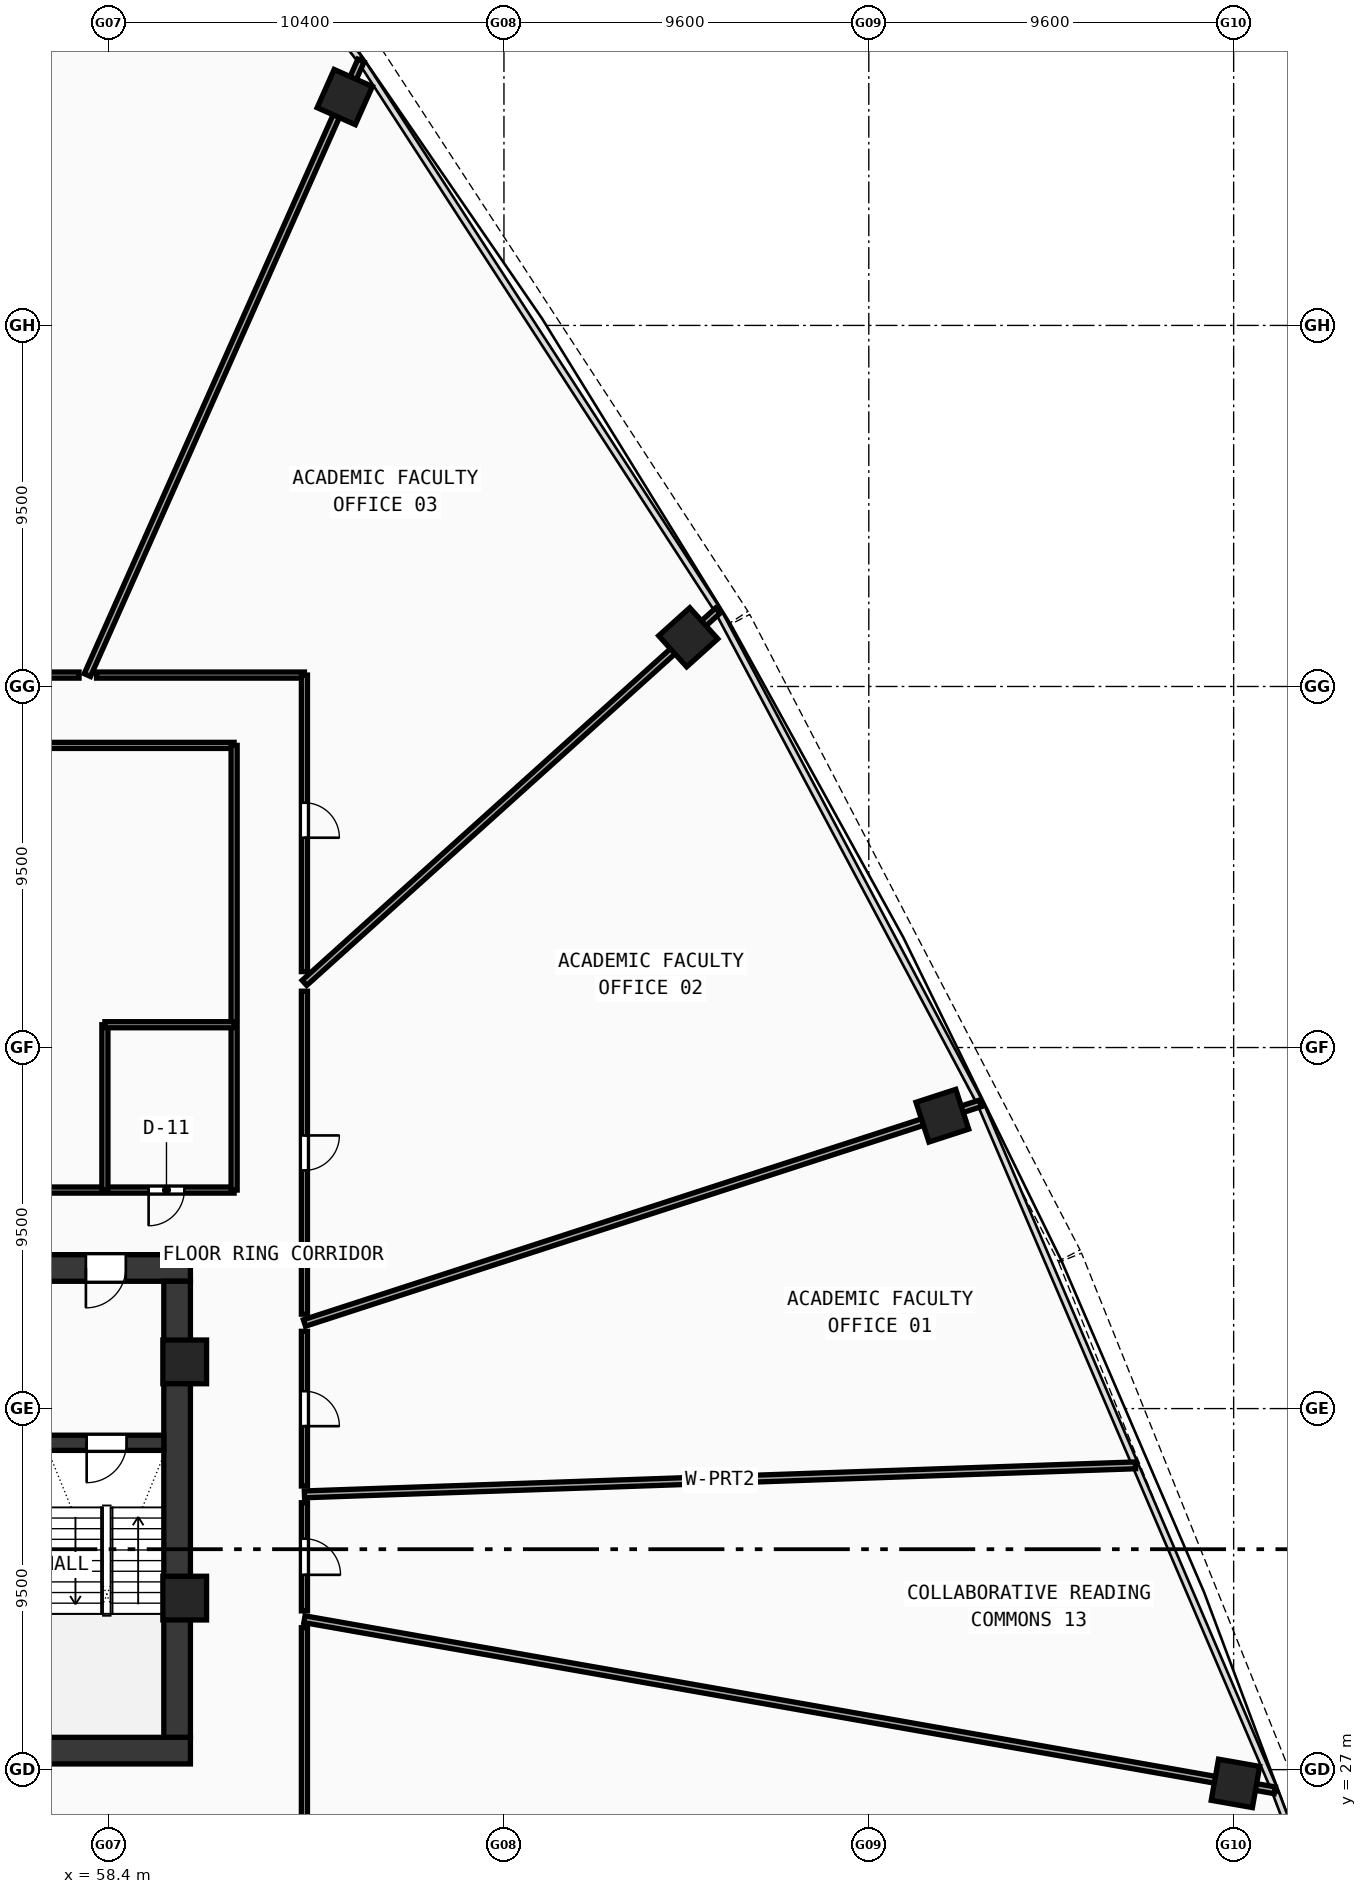
"""IFC4 building model, lengths in metres.
Left out: names, types, materials, properties, quantities, classifications, styles, units other than length and angle.
Written with IfcOpenShell. Run it as: python <this file> out.ifc"""

import sys

from ifc_helpers import new_model, si_unit, direction, frame, frame_2d, origin, origin_with_axes, origin_2d, place, context, subcontext, project, spatial, rectangle, hollow_rectangle, extrude, source, transform, mapped, element, fill, save


model = new_model("IFC4")
c1 = context("Model", 3, precision=1e-05, world=origin(), true_north=direction((0.0, 1.0)))
c2 = subcontext(c1, "Body", "Model", "MODEL_VIEW")
j1 = project(units=[si_unit("LENGTHUNIT", "METRE"), si_unit("PLANEANGLEUNIT", "RADIAN")], contexts=[c1])
p1 = place(None, origin())
s1 = spatial("IfcSite", under=j1, at=p1, CompositionType="ELEMENT")
p2 = place(p1, origin())
s2 = spatial("IfcBuilding", under=s1, at=p2, CompositionType="ELEMENT")
p3 = place(p2, frame((0.0, 0.0, 66.7)))
s3 = spatial("IfcBuildingStorey", under=s2, at=p3, CompositionType="ELEMENT", Elevation=66.7)
p4 = place(p3, frame((35.45, 27.5, 0.0), z_axis=(0.0, 0.0, 1.0), x_axis=(1.0, 0.0, 0.0)))
e1 = element("IfcWall", 1, at=p4, inside=s3, PredefinedType="SHEAR", context=c2, shape_type="SweptSolid", body=[
    extrude(rectangle(XDim=25.1, YDim=0.7, at=frame_2d((12.55, 0.0))), origin(), (0.0, 0.0, 1.0), 3.37),
])
p5 = place(p3, frame((49.2, 40.2, 0.0), z_axis=(0.0, 0.0, 1.0), x_axis=(1.0, 0.0, 0.0)))
e2 = element("IfcWall", 2, at=p5, inside=s3, PredefinedType="SHEAR", context=c2, shape_type="SweptSolid", body=[
    extrude(rectangle(XDim=11.35, YDim=0.7, at=frame_2d((5.675, 0.0))), origin(), (0.0, 0.0, 1.0), 3.37),
])
p6 = place(p5, frame((8.6, 0.0, 0.0)))
e3 = element("IfcOpeningElement", 3, at=p6, cuts=e2, PredefinedType="OPENING", context=c2, shape_type="SweptSolid", body=[
    extrude(rectangle(XDim=1.05, YDim=2.1, at=frame_2d((0.525, 1.05))), frame((0.0, 0.36, 0.0), z_axis=(0.0, -1.0, 0.0), x_axis=(1.0, 0.0, 0.0)), (0.0, 0.0, 1.0), 0.72),
])
p7 = place(p3, frame((60.2, 27.85, 0.0), z_axis=(0.0, 0.0, 1.0), x_axis=(0.0, 1.0, 0.0)))
e4 = element("IfcWall", 4, at=p7, inside=s3, PredefinedType="SHEAR", context=c2, shape_type="SweptSolid", body=[
    extrude(rectangle(XDim=12.0, YDim=0.7, at=frame_2d((6.0, 0.0))), origin(), (0.0, 0.0, 1.0), 3.37),
])
p8 = place(p3, frame((56.8, 35.6, 0.0), z_axis=(0.0, 0.0, 1.0), x_axis=(1.0, 0.0, 0.0)))
e5 = element("IfcWall", 5, at=p8, inside=s3, PredefinedType="SHEAR", context=c2, shape_type="SweptSolid", body=[
    extrude(rectangle(XDim=3.05, YDim=0.4, at=frame_2d((1.525, 0.0))), origin(), (0.0, 0.0, 1.0), 3.37),
])
p9 = place(p8, frame((1.02, 0.0, 0.0)))
e6 = element("IfcOpeningElement", 6, at=p9, cuts=e5, PredefinedType="OPENING", context=c2, shape_type="SweptSolid", body=[
    extrude(rectangle(XDim=1.05, YDim=2.1, at=frame_2d((0.525, 1.05))), frame((0.0, 0.21, 0.0), z_axis=(0.0, -1.0, 0.0), x_axis=(1.0, 0.0, 0.0)), (0.0, 0.0, 1.0), 0.42),
])
m1 = source(origin(), c2, "Body", "SweptSolid", [
    extrude(hollow_rectangle(XDim=1.15, YDim=1.15, WallThickness=0.048, at=origin_2d()), origin(), (0.0, 0.0, 1.0), 3.63),
])
for number, where, z_axis, x_axis in (
    (7, (60.4, 31.513, -0.26), (0.0, 0.0, 1.0), (1.0, 0.0, 0.0)),
    (8, (60.4, 37.729, -0.26), (0.0, 0.0, 1.0), (1.0, 0.0, 0.0)),
):
    element("IfcColumn", number, at=place(p3, frame(where, z_axis=z_axis, x_axis=x_axis)), inside=s3, PredefinedType="COLUMN", context=c2, shape_type="MappedRepresentation", body=[
        mapped(m1, transform((0.0, 0.0, 0.0), scale=1.0)),
    ])
m2 = source(origin(), c2, "Body", "SweptSolid", [
    extrude(hollow_rectangle(XDim=1.1, YDim=1.1, WallThickness=0.045, at=origin_2d()), origin(), (0.0, 0.0, 1.0), 3.63),
])
for number, where, z_axis, x_axis in (
    (9, (88.048, 26.638, -0.26), (0.0, 0.0, 1.0), (0.174, 0.985, 0.0)),
    (10, (80.335, 44.206, -0.26), (0.0, 0.0, 1.0), (-0.309, 0.951, 0.0)),
    (11, (73.649, 56.794, -0.26), (0.0, 0.0, 1.0), (-0.669, 0.743, 0.0)),
    (12, (64.611, 71.009, -0.26), (0.0, 0.0, 1.0), (-0.914, 0.407, 0.0)),
):
    element("IfcColumn", number, at=place(p3, frame(where, z_axis=z_axis, x_axis=x_axis)), inside=s3, PredefinedType="COLUMN", context=c2, shape_type="MappedRepresentation", body=[
        mapped(m2, transform((0.0, 0.0, 0.0), scale=1.0)),
    ])
p10 = place(p3, frame((45.92, 42.25, 0.0), z_axis=(0.0, 0.0, 1.0), x_axis=(1.0, 0.0, 0.0)))
e13 = element("IfcWall", 13, at=p10, inside=s3, PredefinedType="PARTITIONING", context=c2, shape_type="SweptSolid", body=[
    extrude(rectangle(XDim=15.78, YDim=0.16, at=frame_2d((7.89, 0.0))), origin(), (0.0, 0.0, 1.0), 2.67),
])
p11 = place(p10, frame((2.1, 0.0, 0.0)))
e14 = element("IfcOpeningElement", 14, at=p11, cuts=e13, PredefinedType="OPENING", context=c2, shape_type="SweptSolid", body=[
    extrude(rectangle(XDim=0.92, YDim=2.1, at=frame_2d((0.46, 1.05))), frame((0.0, 0.09, 0.0), z_axis=(0.0, -1.0, 0.0), x_axis=(1.0, 0.0, 0.0)), (0.0, 0.0, 1.0), 0.18),
])
p12 = place(p10, frame((13.53, 0.0, 0.0)))
e15 = element("IfcOpeningElement", 15, at=p12, cuts=e13, PredefinedType="OPENING", context=c2, shape_type="SweptSolid", body=[
    extrude(rectangle(XDim=0.94, YDim=2.1, at=frame_2d((0.47, 1.05))), frame((0.0, 0.09, 0.0), z_axis=(0.0, -1.0, 0.0), x_axis=(1.0, 0.0, 0.0)), (0.0, 0.0, 1.0), 0.18),
])
p13 = place(p3, frame((45.92, 53.95, 0.0), z_axis=(0.0, 0.0, 1.0), x_axis=(1.0, 0.0, 0.0)))
e16 = element("IfcWall", 16, at=p13, inside=s3, PredefinedType="PARTITIONING", context=c2, shape_type="SweptSolid", body=[
    extrude(rectangle(XDim=15.78, YDim=0.16, at=frame_2d((7.89, 0.0))), origin(), (0.0, 0.0, 1.0), 2.67),
])
p14 = place(p3, frame((61.7, 42.25, 0.0), z_axis=(0.0, 0.0, 1.0), x_axis=(0.0, 1.0, 0.0)))
e17 = element("IfcWall", 17, at=p14, inside=s3, PredefinedType="PARTITIONING", context=c2, shape_type="SweptSolid", body=[
    extrude(rectangle(XDim=11.7, YDim=0.16, at=frame_2d((5.85, 0.0))), origin(), (0.0, 0.0, 1.0), 2.67),
])
p15 = place(p3, frame((58.3, 42.25, 0.0), z_axis=(0.0, 0.0, 1.0), x_axis=(0.0, 1.0, 0.0)))
e18 = element("IfcWall", 18, at=p15, inside=s3, PredefinedType="PARTITIONING", context=c2, shape_type="SweptSolid", body=[
    extrude(rectangle(XDim=4.35, YDim=0.16, at=frame_2d((2.175, 0.0))), origin(), (0.0, 0.0, 1.0), 2.67),
])
p16 = place(p3, frame((58.3, 46.6, 0.0), z_axis=(0.0, 0.0, 1.0), x_axis=(1.0, 0.0, 0.0)))
e19 = element("IfcWall", 19, at=p16, inside=s3, PredefinedType="PARTITIONING", context=c2, shape_type="SweptSolid", body=[
    extrude(rectangle(XDim=3.4, YDim=0.16, at=frame_2d((1.7, 0.0))), origin(), (0.0, 0.0, 1.0), 2.97),
])
p17 = place(p3, frame((63.55, 34.243, 0.0), z_axis=(0.0, 0.0, 1.0), x_axis=(0.999390701976, 0.034903077271, 0.0)))
e20 = element("IfcWall", 20, at=p17, inside=s3, PredefinedType="PARTITIONING", context=c2, shape_type="SweptSolid", body=[
    extrude(rectangle(XDim=21.88, YDim=0.18, at=frame_2d((10.94, 0.0))), origin(), (0.0, 0.0, 1.0), 2.67),
])
p18 = place(p3, frame((63.55, 38.752, 0.0), z_axis=(0.0, 0.0, 1.0), x_axis=(0.951053160417, 0.309027322514, 0.0)))
e21 = element("IfcWall", 21, at=p18, inside=s3, PredefinedType="PARTITIONING", context=c2, shape_type="SweptSolid", body=[
    extrude(rectangle(XDim=18.699, YDim=0.18, at=frame_2d((9.35, 0.0))), origin(), (0.0, 0.0, 1.0), 2.67),
])
p19 = place(p3, frame((63.55, 47.701, 0.0), z_axis=(0.0, 0.0, 1.0), x_axis=(0.743144860423, 0.669130567547, 0.0)))
e22 = element("IfcWall", 22, at=p19, inside=s3, PredefinedType="PARTITIONING", context=c2, shape_type="SweptSolid", body=[
    extrude(rectangle(XDim=14.639, YDim=0.18, at=frame_2d((7.319, 0.0))), origin(), (0.0, 0.0, 1.0), 2.67),
])
p20 = place(p3, frame((57.84, 55.8, 0.0), z_axis=(0.0, 0.0, 1.0), x_axis=(0.406732277088, 0.913547401493, 0.0)))
e23 = element("IfcWall", 23, at=p20, inside=s3, PredefinedType="PARTITIONING", context=c2, shape_type="SweptSolid", body=[
    extrude(rectangle(XDim=17.698, YDim=0.18, at=frame_2d((8.849, 0.0))), origin(), (0.0, 0.0, 1.0), 2.67),
])
p21 = place(p3, frame((63.55, 30.958, 0.0), z_axis=(0.0, 0.0, 1.0), x_axis=(0.984809239356, -0.173639747982, 0.0)))
e24 = element("IfcWall", 24, at=p21, inside=s3, PredefinedType="PARTITIONING", context=c2, shape_type="SweptSolid", body=[
    extrude(rectangle(XDim=25.926, YDim=0.18, at=frame_2d((12.963, 0.0))), origin(), (0.0, 0.0, 1.0), 2.67),
])
p22 = place(p3, frame((52.391, 55.8, 0.0), z_axis=(0.0, 0.0, 1.0), x_axis=(1.0, 0.0, 0.0)))
e25 = element("IfcWall", 25, at=p22, inside=s3, PredefinedType="PARTITIONING", context=c2, shape_type="SweptSolid", body=[
    extrude(rectangle(XDim=5.229, YDim=0.16, at=frame_2d((2.614, 0.0))), origin(), (0.0, 0.0, 1.0), 2.67),
])
p23 = place(p3, frame((58.08, 55.8, 0.0), z_axis=(0.0, 0.0, 1.0), x_axis=(1.0, 0.0, 0.0)))
e26 = element("IfcWall", 26, at=p23, inside=s3, PredefinedType="PARTITIONING", context=c2, shape_type="SweptSolid", body=[
    extrude(rectangle(XDim=5.47, YDim=0.16, at=frame_2d((2.735, 0.0))), origin(), (0.0, 0.0, 1.0), 3.37),
])
p24 = place(p3, frame((63.55, 55.8, 0.0), z_axis=(0.0, 0.0, 1.0), x_axis=(0.0, -1.0, 0.0)))
e27 = element("IfcWall", 27, at=p24, inside=s3, PredefinedType="PARTITIONING", context=c2, shape_type="SweptSolid", body=[
    extrude(rectangle(XDim=7.803, YDim=0.16, at=frame_2d((3.901, 0.0))), origin(), (0.0, 0.0, 1.0), 3.37),
])
p25 = place(p24, frame((3.359, 0.0, 0.0)))
e28 = element("IfcOpeningElement", 28, at=p25, cuts=e27, PredefinedType="OPENING", context=c2, shape_type="SweptSolid", body=[
    extrude(rectangle(XDim=0.92, YDim=2.1, at=frame_2d((0.46, 1.05))), frame((0.0, 0.09, 0.0), z_axis=(0.0, -1.0, 0.0), x_axis=(1.0, 0.0, 0.0)), (0.0, 0.0, 1.0), 0.18),
])
p26 = place(p3, frame((63.55, 47.482, 0.0), z_axis=(0.0, 0.0, 1.0), x_axis=(0.0, -1.0, 0.0)))
e29 = element("IfcWall", 29, at=p26, inside=s3, PredefinedType="PARTITIONING", context=c2, shape_type="SweptSolid", body=[
    extrude(rectangle(XDim=8.498, YDim=0.16, at=frame_2d((4.249, 0.0))), origin(), (0.0, 0.0, 1.0), 2.67),
])
p27 = place(p26, frame((3.795, 0.0, 0.0)))
e30 = element("IfcOpeningElement", 30, at=p27, cuts=e29, PredefinedType="OPENING", context=c2, shape_type="SweptSolid", body=[
    extrude(rectangle(XDim=0.92, YDim=2.1, at=frame_2d((0.46, 1.05))), frame((0.0, 0.09, 0.0), z_axis=(0.0, -1.0, 0.0), x_axis=(1.0, 0.0, 0.0)), (0.0, 0.0, 1.0), 0.18),
])
p28 = place(p3, frame((63.55, 38.533, 0.0), z_axis=(0.0, 0.0, 1.0), x_axis=(0.0, -1.0, 0.0)))
e31 = element("IfcWall", 31, at=p28, inside=s3, PredefinedType="PARTITIONING", context=c2, shape_type="SweptSolid", body=[
    extrude(rectangle(XDim=4.07, YDim=0.16, at=frame_2d((2.035, 0.0))), origin(), (0.0, 0.0, 1.0), 3.37),
])
p29 = place(p28, frame((1.575, 0.0, 0.0)))
e32 = element("IfcOpeningElement", 32, at=p29, cuts=e31, PredefinedType="OPENING", context=c2, shape_type="SweptSolid", body=[
    extrude(rectangle(XDim=0.92, YDim=2.1, at=frame_2d((0.46, 1.05))), frame((0.0, 0.09, 0.0), z_axis=(0.0, -1.0, 0.0), x_axis=(1.0, 0.0, 0.0)), (0.0, 0.0, 1.0), 0.18),
])
p30 = place(p3, frame((63.55, 34.023, 0.0), z_axis=(0.0, 0.0, 1.0), x_axis=(0.0, -1.0, 0.0)))
e33 = element("IfcWall", 33, at=p30, inside=s3, PredefinedType="PARTITIONING", context=c2, shape_type="SweptSolid", body=[
    extrude(rectangle(XDim=2.845, YDim=0.16, at=frame_2d((1.423, 0.0))), origin(), (0.0, 0.0, 1.0), 3.37),
])
p31 = place(p30, frame((0.948, 0.0, 0.0)))
e34 = element("IfcOpeningElement", 34, at=p31, cuts=e33, PredefinedType="OPENING", context=c2, shape_type="SweptSolid", body=[
    extrude(rectangle(XDim=0.95, YDim=2.1, at=frame_2d((0.475, 1.05))), frame((0.0, 0.09, 0.0), z_axis=(0.0, -1.0, 0.0), x_axis=(1.0, 0.0, 0.0)), (0.0, 0.0, 1.0), 0.18),
])
p32 = place(p3, frame((63.55, 30.735, 0.0), z_axis=(0.0, 0.0, 1.0), x_axis=(0.0, -1.0, 0.0)))
e35 = element("IfcWall", 35, at=p32, inside=s3, PredefinedType="PARTITIONING", context=c2, shape_type="SweptSolid", body=[
    extrude(rectangle(XDim=5.935, YDim=0.16, at=frame_2d((2.967, 0.0))), origin(), (0.0, 0.0, 1.0), 2.97),
])
m3 = source(origin(), c2, "Body", "SweptSolid", [
    extrude(rectangle(XDim=1.05, YDim=2.1, at=frame_2d((0.525, 1.05))), frame((0.0, 0.025, 0.0), z_axis=(0.0, -1.0, 0.0), x_axis=(1.0, 0.0, 0.0)), (0.0, 0.0, 1.0), 0.05),
])
p33 = place(p9, frame((1.05, 0.0, 0.0), z_axis=(0.0, 0.0, 1.0), x_axis=(-1.0, 0.0, 0.0)))
e36 = element("IfcDoor", 36, at=p33, inside=s3, OperationType="SINGLE_SWING_RIGHT", PredefinedType="DOOR", context=c2, shape_type="MappedRepresentation", body=[
    mapped(m3, transform((0.0, 0.0, 0.0), scale=1.0)),
])
fill(e6, e36)
p34 = place(p6, frame((1.05, 0.0, 0.0), z_axis=(0.0, 0.0, 1.0), x_axis=(-1.0, 0.0, 0.0)))
e37 = element("IfcDoor", 37, at=p34, inside=s3, OperationType="SINGLE_SWING_RIGHT", PredefinedType="DOOR", context=c2, shape_type="MappedRepresentation", body=[
    mapped(m3, transform((0.0, 0.0, 0.0), scale=1.0)),
])
fill(e3, e37)
m4 = source(origin(), c2, "Body", "SweptSolid", [
    extrude(rectangle(XDim=0.94, YDim=2.1, at=frame_2d((0.47, 1.05))), frame((0.0, 0.025, 0.0), z_axis=(0.0, -1.0, 0.0), x_axis=(1.0, 0.0, 0.0)), (0.0, 0.0, 1.0), 0.05),
])
p35 = place(p12, frame((0.94, 0.0, 0.0), z_axis=(0.0, 0.0, 1.0), x_axis=(-1.0, 0.0, 0.0)))
e38 = element("IfcDoor", 38, at=p35, inside=s3, OperationType="SINGLE_SWING_RIGHT", PredefinedType="DOOR", context=c2, shape_type="MappedRepresentation", body=[
    mapped(m4, transform((0.0, 0.0, 0.0), scale=1.0)),
])
fill(e15, e38)
m5 = source(origin(), c2, "Body", "SweptSolid", [
    extrude(rectangle(XDim=0.92, YDim=2.1, at=frame_2d((0.46, 1.05))), frame((0.0, 0.025, 0.0), z_axis=(0.0, -1.0, 0.0), x_axis=(1.0, 0.0, 0.0)), (0.0, 0.0, 1.0), 0.05),
])
p36 = place(p29, origin_with_axes())
e39 = element("IfcDoor", 39, at=p36, inside=s3, OperationType="SINGLE_SWING_RIGHT", PredefinedType="DOOR", context=c2, shape_type="MappedRepresentation", body=[
    mapped(m5, transform((0.0, 0.0, 0.0), scale=1.0)),
])
fill(e32, e39)
p37 = place(p27, origin_with_axes())
e40 = element("IfcDoor", 40, at=p37, inside=s3, OperationType="SINGLE_SWING_LEFT", PredefinedType="DOOR", context=c2, shape_type="MappedRepresentation", body=[
    mapped(m5, transform((0.0, 0.0, 0.0), scale=1.0)),
])
fill(e30, e40)
p38 = place(p25, origin_with_axes())
e41 = element("IfcDoor", 41, at=p38, inside=s3, OperationType="SINGLE_SWING_RIGHT", PredefinedType="DOOR", context=c2, shape_type="MappedRepresentation", body=[
    mapped(m5, transform((0.0, 0.0, 0.0), scale=1.0)),
])
fill(e28, e41)
m6 = source(origin(), c2, "Body", "SweptSolid", [
    extrude(rectangle(XDim=0.95, YDim=2.1, at=frame_2d((0.475, 1.05))), frame((0.0, 0.025, 0.0), z_axis=(0.0, -1.0, 0.0), x_axis=(1.0, 0.0, 0.0)), (0.0, 0.0, 1.0), 0.05),
])
p39 = place(p31, origin_with_axes())
e42 = element("IfcDoor", 42, at=p39, inside=s3, OperationType="SINGLE_SWING_RIGHT", PredefinedType="DOOR", context=c2, shape_type="MappedRepresentation", body=[
    mapped(m6, transform((0.0, 0.0, 0.0), scale=1.0)),
])
fill(e34, e42)
save(model, sys.argv[1])
